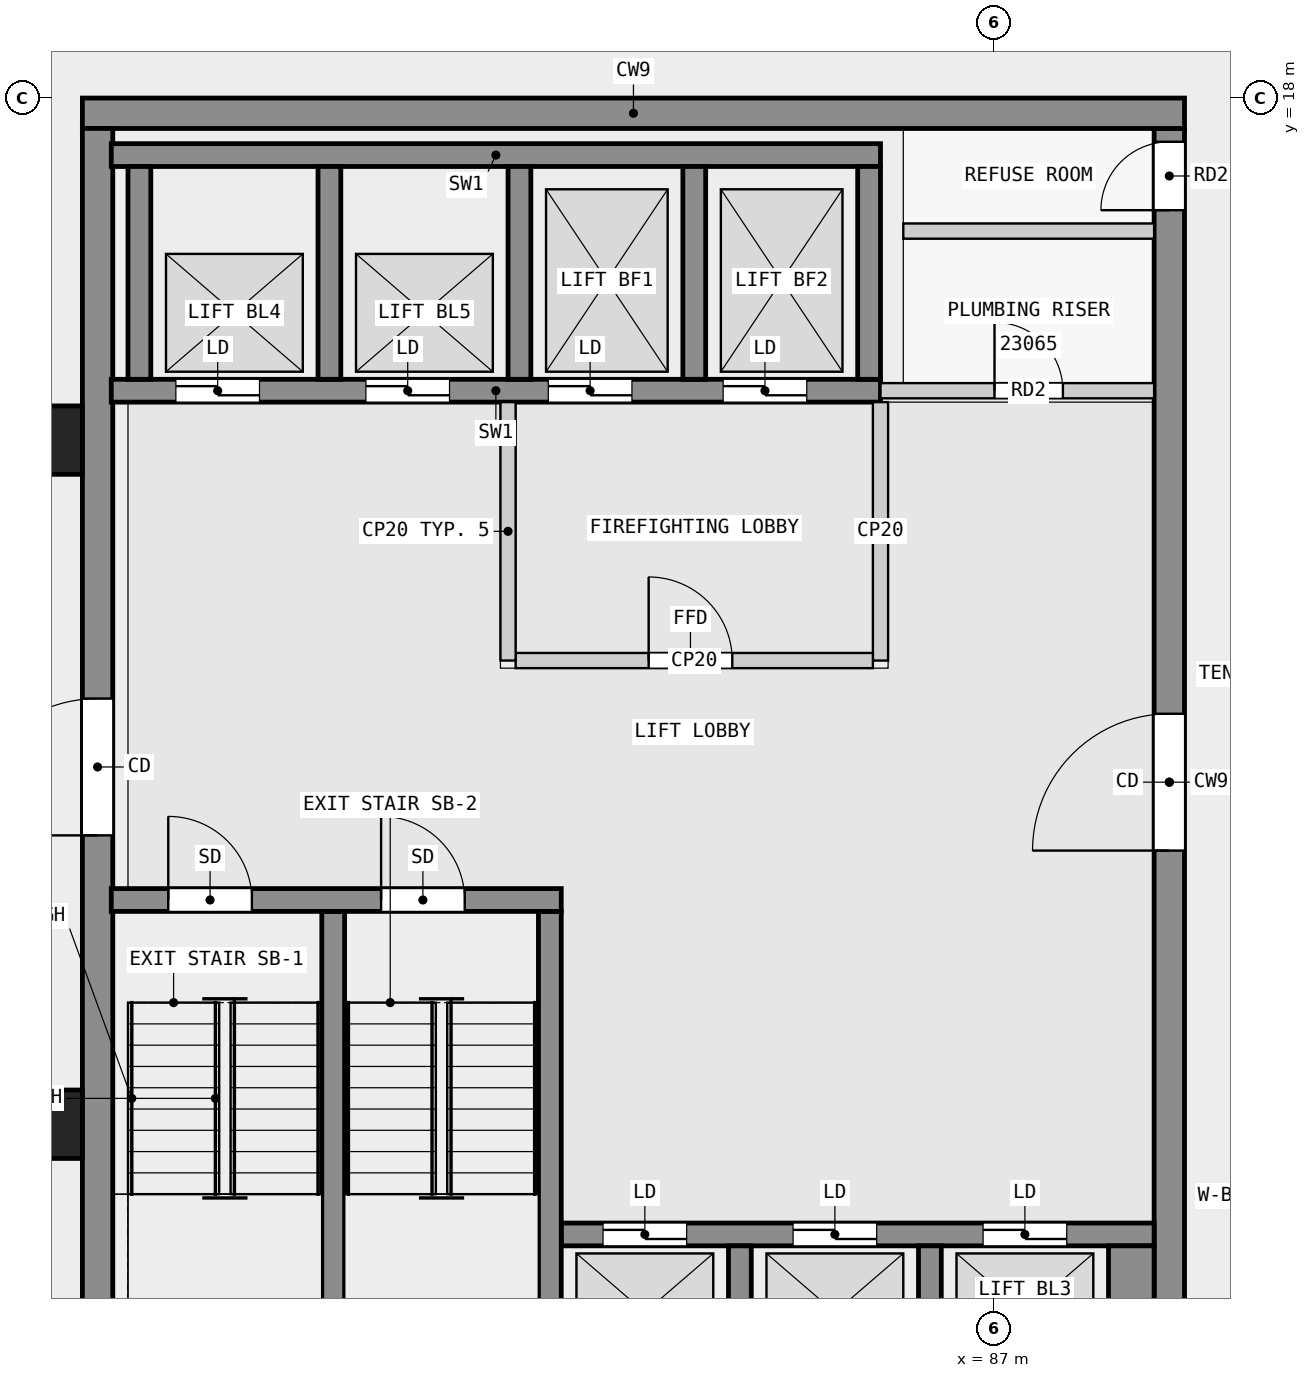
"""IFC4 building model, lengths in metres.
Left out: names, types, materials, properties, quantities, classifications, styles, units other than length and angle.
Written with IfcOpenShell. Run it as: python <this file> out.ifc"""

import sys

from ifc_helpers import new_model, si_unit, direction, frame, frame_2d, origin, origin_2d, place, context, subcontext, project, spatial, rectangle, extrude, element, fill, save


model = new_model("IFC4")
c1 = context("Model", 3, precision=1e-05, world=origin(), true_north=direction((0.0, 1.0)))
c2 = subcontext(c1, "Body", "Model", "MODEL_VIEW")
j1 = project(units=[si_unit("LENGTHUNIT", "METRE"), si_unit("PLANEANGLEUNIT", "RADIAN")], contexts=[c1])
p1 = place(None, origin())
s1 = spatial("IfcSite", under=j1, at=p1, CompositionType="ELEMENT")
p2 = place(p1, origin())
s2 = spatial("IfcBuilding", under=s1, at=p2, CompositionType="ELEMENT")
p3 = place(p2, frame((0.0, 0.0, 92.3)))
s3 = spatial("IfcBuildingStorey", under=s2, at=p3, CompositionType="ELEMENT", Elevation=92.3)
for number, where, z_axis, x_axis in (
    (1, (74.55, 13.5, 0.0), (0.0, 0.0, 1.0), (1.0, 0.0, 0.0)),
    (2, (74.55, 4.5, 0.0), (0.0, 0.0, 1.0), (1.0, 0.0, 0.0)),
):
    element("IfcColumn", number, at=place(p3, frame(where, z_axis=z_axis, x_axis=x_axis)), inside=s3, PredefinedType="COLUMN", context=c2, shape_type="SweptSolid", body=[
        extrude(rectangle(XDim=0.9, YDim=0.9, at=origin_2d()), origin(), (0.0, 0.0, 1.0), 3.5),
    ])
p4 = place(p3, frame((75.0, 17.8, 0.0), z_axis=(0.0, 0.0, 1.0), x_axis=(1.0, 0.0, 0.0)))
e3 = element("IfcWall", 3, at=p4, inside=s3, PredefinedType="SHEAR", context=c2, shape_type="SweptSolid", body=[
    extrude(rectangle(XDim=14.5, YDim=0.4, at=frame_2d((7.25, 0.0))), origin(), (0.0, 0.0, 1.0), 3.25),
])
p5 = place(p3, frame((75.2, 0.4, 0.0), z_axis=(0.0, 0.0, 1.0), x_axis=(0.0, 1.0, 0.0)))
e4 = element("IfcWall", 4, at=p5, inside=s3, PredefinedType="SHEAR", context=c2, shape_type="SweptSolid", body=[
    extrude(rectangle(XDim=17.2, YDim=0.4, at=frame_2d((8.6, 0.0))), origin(), (0.0, 0.0, 1.0), 3.25),
])
p6 = place(p5, frame((7.9, 0.0, 0.0)))
e5 = element("IfcOpeningElement", 5, at=p6, cuts=e4, PredefinedType="OPENING", context=c2, shape_type="SweptSolid", body=[
    extrude(rectangle(XDim=1.8, YDim=2.1, at=frame_2d((0.9, 1.05))), frame((0.0, 0.21, 0.0), z_axis=(0.0, -1.0, 0.0), x_axis=(1.0, 0.0, 0.0)), (0.0, 0.0, 1.0), 0.42),
])
p7 = place(p3, frame((89.3, 0.4, 0.0), z_axis=(0.0, 0.0, 1.0), x_axis=(0.0, 1.0, 0.0)))
e6 = element("IfcWall", 6, at=p7, inside=s3, PredefinedType="SHEAR", context=c2, shape_type="SweptSolid", body=[
    extrude(rectangle(XDim=17.2, YDim=0.4, at=frame_2d((8.6, 0.0))), origin(), (0.0, 0.0, 1.0), 3.25),
])
p8 = place(p7, frame((7.7, 0.0, 0.0)))
e7 = element("IfcOpeningElement", 7, at=p8, cuts=e6, PredefinedType="OPENING", context=c2, shape_type="SweptSolid", body=[
    extrude(rectangle(XDim=1.8, YDim=2.1, at=frame_2d((0.9, 1.05))), frame((0.0, 0.21, 0.0), z_axis=(0.0, -1.0, 0.0), x_axis=(1.0, 0.0, 0.0)), (0.0, 0.0, 1.0), 0.42),
])
p9 = place(p7, frame((16.125, 0.0, 0.0)))
e8 = element("IfcOpeningElement", 8, at=p9, cuts=e6, PredefinedType="OPENING", context=c2, shape_type="SweptSolid", body=[
    extrude(rectangle(XDim=0.9, YDim=2.1, at=frame_2d((0.45, 1.05))), frame((0.0, 0.21, 0.0), z_axis=(0.0, -1.0, 0.0), x_axis=(1.0, 0.0, 0.0)), (0.0, 0.0, 1.0), 0.42),
])
p10 = place(p3, frame((75.38, 7.45, 0.0), z_axis=(0.0, 0.0, 1.0), x_axis=(1.0, 0.0, 0.0)))
e9 = element("IfcWall", 9, at=p10, inside=s3, PredefinedType="SHEAR", context=c2, shape_type="SweptSolid", body=[
    extrude(rectangle(XDim=5.92, YDim=0.3, at=frame_2d((2.96, 0.0))), origin(), (0.0, 0.0, 1.0), 3.25),
])
p11 = place(p10, frame((0.75, 0.0, 0.0)))
e10 = element("IfcOpeningElement", 10, at=p11, cuts=e9, PredefinedType="OPENING", context=c2, shape_type="SweptSolid", body=[
    extrude(rectangle(XDim=1.1, YDim=2.1, at=frame_2d((0.55, 1.05))), frame((0.0, 0.16, 0.0), z_axis=(0.0, -1.0, 0.0), x_axis=(1.0, 0.0, 0.0)), (0.0, 0.0, 1.0), 0.32),
])
p12 = place(p10, frame((3.55, 0.0, 0.0)))
e11 = element("IfcOpeningElement", 11, at=p12, cuts=e9, PredefinedType="OPENING", context=c2, shape_type="SweptSolid", body=[
    extrude(rectangle(XDim=1.1, YDim=2.1, at=frame_2d((0.55, 1.05))), frame((0.0, 0.16, 0.0), z_axis=(0.0, -1.0, 0.0), x_axis=(1.0, 0.0, 0.0)), (0.0, 0.0, 1.0), 0.32),
])
for number, where, z_axis, x_axis in (
    (12, (78.3, 0.9, 0.0), (0.0, 0.0, 1.0), (0.0, 1.0, 0.0)),
    (13, (81.15, 0.9, 0.0), (0.0, 0.0, 1.0), (0.0, 1.0, 0.0)),
):
    element("IfcWall", number, at=place(p3, frame(where, z_axis=z_axis, x_axis=x_axis)), inside=s3, PredefinedType="SHEAR", context=c2, shape_type="SweptSolid", body=[
        extrude(rectangle(XDim=6.4, YDim=0.3, at=frame_2d((3.2, 0.0))), origin(), (0.0, 0.0, 1.0), 3.25),
    ])
for number, where, z_axis, x_axis in (
    (14, (83.65, 0.9, 0.0), (0.0, 0.0, 1.0), (0.0, 1.0, 0.0)),
    (15, (86.15, 0.9, 0.0), (0.0, 0.0, 1.0), (0.0, 1.0, 0.0)),
):
    element("IfcWall", number, at=place(p3, frame(where, z_axis=z_axis, x_axis=x_axis)), inside=s3, PredefinedType="SHEAR", context=c2, shape_type="SweptSolid", body=[
        extrude(rectangle(XDim=2.0, YDim=0.3, at=frame_2d((1.0, 0.0))), origin(), (0.0, 0.0, 1.0), 3.25),
    ])
p13 = place(p3, frame((88.8, 0.9, 0.0), z_axis=(0.0, 0.0, 1.0), x_axis=(0.0, 1.0, 0.0)))
e16 = element("IfcWall", 16, at=p13, inside=s3, PredefinedType="SHEAR", context=c2, shape_type="SweptSolid", body=[
    extrude(rectangle(XDim=2.0, YDim=0.6, at=frame_2d((1.0, 0.0))), origin(), (0.0, 0.0, 1.0), 3.25),
])
p14 = place(p3, frame((81.3, 3.05, 0.0), z_axis=(0.0, 0.0, 1.0), x_axis=(1.0, 0.0, 0.0)))
e17 = element("IfcWall", 17, at=p14, inside=s3, PredefinedType="SHEAR", context=c2, shape_type="SweptSolid", body=[
    extrude(rectangle(XDim=7.8, YDim=0.3, at=frame_2d((3.9, 0.0))), origin(), (0.0, 0.0, 1.0), 3.25),
])
p15 = place(p14, frame((0.55, 0.0, 0.0)))
e18 = element("IfcOpeningElement", 18, at=p15, cuts=e17, PredefinedType="OPENING", context=c2, shape_type="SweptSolid", body=[
    extrude(rectangle(XDim=1.1, YDim=2.1, at=frame_2d((0.55, 1.05))), frame((0.0, 0.16, 0.0), z_axis=(0.0, -1.0, 0.0), x_axis=(1.0, 0.0, 0.0)), (0.0, 0.0, 1.0), 0.32),
])
p16 = place(p14, frame((3.05, 0.0, 0.0)))
e19 = element("IfcOpeningElement", 19, at=p16, cuts=e17, PredefinedType="OPENING", context=c2, shape_type="SweptSolid", body=[
    extrude(rectangle(XDim=1.1, YDim=2.1, at=frame_2d((0.55, 1.05))), frame((0.0, 0.16, 0.0), z_axis=(0.0, -1.0, 0.0), x_axis=(1.0, 0.0, 0.0)), (0.0, 0.0, 1.0), 0.32),
])
p17 = place(p14, frame((5.55, 0.0, 0.0)))
e20 = element("IfcOpeningElement", 20, at=p17, cuts=e17, PredefinedType="OPENING", context=c2, shape_type="SweptSolid", body=[
    extrude(rectangle(XDim=1.1, YDim=2.1, at=frame_2d((0.55, 1.05))), frame((0.0, 0.16, 0.0), z_axis=(0.0, -1.0, 0.0), x_axis=(1.0, 0.0, 0.0)), (0.0, 0.0, 1.0), 0.32),
])
p18 = place(p3, frame((75.38, 17.25, 0.0), z_axis=(0.0, 0.0, 1.0), x_axis=(1.0, 0.0, 0.0)))
e21 = element("IfcWall", 21, at=p18, inside=s3, PredefinedType="SHEAR", context=c2, shape_type="SweptSolid", body=[
    extrude(rectangle(XDim=10.12, YDim=0.3, at=frame_2d((5.06, 0.0))), origin(), (0.0, 0.0, 1.0), 3.25),
])
p19 = place(p3, frame((75.38, 14.15, 0.0), z_axis=(0.0, 0.0, 1.0), x_axis=(1.0, 0.0, 0.0)))
e22 = element("IfcWall", 22, at=p19, inside=s3, PredefinedType="SHEAR", context=c2, shape_type="SweptSolid", body=[
    extrude(rectangle(XDim=10.12, YDim=0.3, at=frame_2d((5.06, 0.0))), origin(), (0.0, 0.0, 1.0), 3.25),
])
p20 = place(p19, frame((0.85, 0.0, 0.0)))
e23 = element("IfcOpeningElement", 23, at=p20, cuts=e22, PredefinedType="OPENING", context=c2, shape_type="SweptSolid", body=[
    extrude(rectangle(XDim=1.1, YDim=2.1, at=frame_2d((0.55, 1.05))), frame((0.0, 0.16, 0.0), z_axis=(0.0, -1.0, 0.0), x_axis=(1.0, 0.0, 0.0)), (0.0, 0.0, 1.0), 0.32),
])
p21 = place(p19, frame((3.35, 0.0, 0.0)))
e24 = element("IfcOpeningElement", 24, at=p21, cuts=e22, PredefinedType="OPENING", context=c2, shape_type="SweptSolid", body=[
    extrude(rectangle(XDim=1.1, YDim=2.1, at=frame_2d((0.55, 1.05))), frame((0.0, 0.16, 0.0), z_axis=(0.0, -1.0, 0.0), x_axis=(1.0, 0.0, 0.0)), (0.0, 0.0, 1.0), 0.32),
])
p22 = place(p19, frame((5.75, 0.0, 0.0)))
e25 = element("IfcOpeningElement", 25, at=p22, cuts=e22, PredefinedType="OPENING", context=c2, shape_type="SweptSolid", body=[
    extrude(rectangle(XDim=1.1, YDim=2.1, at=frame_2d((0.55, 1.05))), frame((0.0, 0.16, 0.0), z_axis=(0.0, -1.0, 0.0), x_axis=(1.0, 0.0, 0.0)), (0.0, 0.0, 1.0), 0.32),
])
p23 = place(p19, frame((8.05, 0.0, 0.0)))
e26 = element("IfcOpeningElement", 26, at=p23, cuts=e22, PredefinedType="OPENING", context=c2, shape_type="SweptSolid", body=[
    extrude(rectangle(XDim=1.1, YDim=2.1, at=frame_2d((0.55, 1.05))), frame((0.0, 0.16, 0.0), z_axis=(0.0, -1.0, 0.0), x_axis=(1.0, 0.0, 0.0)), (0.0, 0.0, 1.0), 0.32),
])
for number, where, z_axis, x_axis in (
    (27, (75.75, 14.3, 0.0), (0.0, 0.0, 1.0), (0.0, 1.0, 0.0)),
    (28, (78.25, 14.3, 0.0), (0.0, 0.0, 1.0), (0.0, 1.0, 0.0)),
    (29, (80.75, 14.3, 0.0), (0.0, 0.0, 1.0), (0.0, 1.0, 0.0)),
    (30, (83.05, 14.3, 0.0), (0.0, 0.0, 1.0), (0.0, 1.0, 0.0)),
    (31, (85.35, 14.3, 0.0), (0.0, 0.0, 1.0), (0.0, 1.0, 0.0)),
):
    element("IfcWall", number, at=place(p3, frame(where, z_axis=z_axis, x_axis=x_axis)), inside=s3, PredefinedType="SHEAR", context=c2, shape_type="SweptSolid", body=[
        extrude(rectangle(XDim=2.8, YDim=0.3, at=frame_2d((1.4, 0.0))), origin(), (0.0, 0.0, 1.0), 3.25),
    ])
p24 = place(p3, frame((80.6, 10.6, 0.0), z_axis=(0.0, 0.0, 1.0), x_axis=(0.0, 1.0, 0.0)))
e32 = element("IfcWall", 32, at=p24, inside=s3, PredefinedType="PARTITIONING", context=c2, shape_type="SweptSolid", body=[
    extrude(rectangle(XDim=3.4, YDim=0.2, at=frame_2d((1.7, 0.0))), origin(), (0.0, 0.0, 1.0), 3.25),
])
p25 = place(p3, frame((80.7, 10.6, 0.0), z_axis=(0.0, 0.0, 1.0), x_axis=(1.0, 0.0, 0.0)))
e33 = element("IfcWall", 33, at=p25, inside=s3, PredefinedType="PARTITIONING", context=c2, shape_type="SweptSolid", body=[
    extrude(rectangle(XDim=4.7, YDim=0.2, at=frame_2d((2.35, 0.0))), origin(), (0.0, 0.0, 1.0), 3.25),
])
p26 = place(p25, frame((1.75, 0.0, 0.0)))
e34 = element("IfcOpeningElement", 34, at=p26, cuts=e33, PredefinedType="OPENING", context=c2, shape_type="SweptSolid", body=[
    extrude(rectangle(XDim=1.1, YDim=2.1, at=frame_2d((0.55, 1.05))), frame((0.0, 0.11, 0.0), z_axis=(0.0, -1.0, 0.0), x_axis=(1.0, 0.0, 0.0)), (0.0, 0.0, 1.0), 0.22),
])
p27 = place(p3, frame((85.5, 10.6, 0.0), z_axis=(0.0, 0.0, 1.0), x_axis=(0.0, 1.0, 0.0)))
e35 = element("IfcWall", 35, at=p27, inside=s3, PredefinedType="PARTITIONING", context=c2, shape_type="SweptSolid", body=[
    extrude(rectangle(XDim=3.4, YDim=0.2, at=frame_2d((1.7, 0.0))), origin(), (0.0, 0.0, 1.0), 3.25),
])
p28 = place(p3, frame((85.5, 14.15, 0.0), z_axis=(0.0, 0.0, 1.0), x_axis=(1.0, 0.0, 0.0)))
e36 = element("IfcWall", 36, at=p28, inside=s3, PredefinedType="PARTITIONING", context=c2, shape_type="SweptSolid", body=[
    extrude(rectangle(XDim=3.6, YDim=0.2, at=frame_2d((1.8, 0.0))), origin(), (0.0, 0.0, 1.0), 3.25),
])
p29 = place(p28, frame((1.5, 0.0, 0.0)))
e37 = element("IfcOpeningElement", 37, at=p29, cuts=e36, PredefinedType="OPENING", context=c2, shape_type="SweptSolid", body=[
    extrude(rectangle(XDim=0.9, YDim=2.1, at=frame_2d((0.45, 1.05))), frame((0.0, 0.11, 0.0), z_axis=(0.0, -1.0, 0.0), x_axis=(1.0, 0.0, 0.0)), (0.0, 0.0, 1.0), 0.22),
])
p30 = place(p3, frame((85.8, 16.25, 0.0), z_axis=(0.0, 0.0, 1.0), x_axis=(1.0, 0.0, 0.0)))
e38 = element("IfcWall", 38, at=p30, inside=s3, PredefinedType="PARTITIONING", context=c2, shape_type="SweptSolid", body=[
    extrude(rectangle(XDim=3.3, YDim=0.2, at=frame_2d((1.65, 0.0))), origin(), (0.0, 0.0, 1.0), 3.25),
])
p31 = place(p26, origin())
e39 = element("IfcDoor", 39, at=p31, inside=s3, OperationType="SINGLE_SWING_LEFT", PredefinedType="DOOR", context=c2, shape_type="SweptSolid", body=[
    extrude(rectangle(XDim=1.1, YDim=2.1, at=frame_2d((0.55, 1.05))), frame((0.0, 0.025, 0.0), z_axis=(0.0, -1.0, 0.0), x_axis=(1.0, 0.0, 0.0)), (0.0, 0.0, 1.0), 0.05),
])
fill(e34, e39)
p32 = place(p15, origin())
e40 = element("IfcDoor", 40, at=p32, inside=s3, OperationType="DOUBLE_DOOR_SLIDING", PredefinedType="DOOR", context=c2, shape_type="SweptSolid", body=[
    extrude(rectangle(XDim=1.1, YDim=2.1, at=frame_2d((0.55, 1.05))), frame((0.0, 0.025, 0.0), z_axis=(0.0, -1.0, 0.0), x_axis=(1.0, 0.0, 0.0)), (0.0, 0.0, 1.0), 0.05),
])
fill(e18, e40)
p33 = place(p16, origin())
e41 = element("IfcDoor", 41, at=p33, inside=s3, OperationType="DOUBLE_DOOR_SLIDING", PredefinedType="DOOR", context=c2, shape_type="SweptSolid", body=[
    extrude(rectangle(XDim=1.1, YDim=2.1, at=frame_2d((0.55, 1.05))), frame((0.0, 0.025, 0.0), z_axis=(0.0, -1.0, 0.0), x_axis=(1.0, 0.0, 0.0)), (0.0, 0.0, 1.0), 0.05),
])
fill(e19, e41)
p34 = place(p17, origin())
e42 = element("IfcDoor", 42, at=p34, inside=s3, OperationType="DOUBLE_DOOR_SLIDING", PredefinedType="DOOR", context=c2, shape_type="SweptSolid", body=[
    extrude(rectangle(XDim=1.1, YDim=2.1, at=frame_2d((0.55, 1.05))), frame((0.0, 0.025, 0.0), z_axis=(0.0, -1.0, 0.0), x_axis=(1.0, 0.0, 0.0)), (0.0, 0.0, 1.0), 0.05),
])
fill(e20, e42)
p35 = place(p20, origin())
e43 = element("IfcDoor", 43, at=p35, inside=s3, OperationType="DOUBLE_DOOR_SLIDING", PredefinedType="DOOR", context=c2, shape_type="SweptSolid", body=[
    extrude(rectangle(XDim=1.1, YDim=2.1, at=frame_2d((0.55, 1.05))), frame((0.0, 0.025, 0.0), z_axis=(0.0, -1.0, 0.0), x_axis=(1.0, 0.0, 0.0)), (0.0, 0.0, 1.0), 0.05),
])
fill(e23, e43)
p36 = place(p21, origin())
e44 = element("IfcDoor", 44, at=p36, inside=s3, OperationType="DOUBLE_DOOR_SLIDING", PredefinedType="DOOR", context=c2, shape_type="SweptSolid", body=[
    extrude(rectangle(XDim=1.1, YDim=2.1, at=frame_2d((0.55, 1.05))), frame((0.0, 0.025, 0.0), z_axis=(0.0, -1.0, 0.0), x_axis=(1.0, 0.0, 0.0)), (0.0, 0.0, 1.0), 0.05),
])
fill(e24, e44)
p37 = place(p22, origin())
e45 = element("IfcDoor", 45, at=p37, inside=s3, OperationType="DOUBLE_DOOR_SLIDING", PredefinedType="DOOR", context=c2, shape_type="SweptSolid", body=[
    extrude(rectangle(XDim=1.1, YDim=2.1, at=frame_2d((0.55, 1.05))), frame((0.0, 0.025, 0.0), z_axis=(0.0, -1.0, 0.0), x_axis=(1.0, 0.0, 0.0)), (0.0, 0.0, 1.0), 0.05),
])
fill(e25, e45)
p38 = place(p23, origin())
e46 = element("IfcDoor", 46, at=p38, inside=s3, OperationType="DOUBLE_DOOR_SLIDING", PredefinedType="DOOR", context=c2, shape_type="SweptSolid", body=[
    extrude(rectangle(XDim=1.1, YDim=2.1, at=frame_2d((0.55, 1.05))), frame((0.0, 0.025, 0.0), z_axis=(0.0, -1.0, 0.0), x_axis=(1.0, 0.0, 0.0)), (0.0, 0.0, 1.0), 0.05),
])
fill(e26, e46)
p39 = place(p11, origin())
e47 = element("IfcDoor", 47, at=p39, inside=s3, OperationType="SINGLE_SWING_RIGHT", PredefinedType="DOOR", context=c2, shape_type="SweptSolid", body=[
    extrude(rectangle(XDim=1.1, YDim=2.1, at=frame_2d((0.55, 1.05))), frame((0.0, 0.025, 0.0), z_axis=(0.0, -1.0, 0.0), x_axis=(1.0, 0.0, 0.0)), (0.0, 0.0, 1.0), 0.05),
])
fill(e10, e47)
p40 = place(p12, origin())
e48 = element("IfcDoor", 48, at=p40, inside=s3, OperationType="SINGLE_SWING_LEFT", PredefinedType="DOOR", context=c2, shape_type="SweptSolid", body=[
    extrude(rectangle(XDim=1.1, YDim=2.1, at=frame_2d((0.55, 1.05))), frame((0.0, 0.025, 0.0), z_axis=(0.0, -1.0, 0.0), x_axis=(1.0, 0.0, 0.0)), (0.0, 0.0, 1.0), 0.05),
])
fill(e11, e48)
p41 = place(p6, origin())
e49 = element("IfcDoor", 49, at=p41, inside=s3, OperationType="DOUBLE_DOOR_SINGLE_SWING", PredefinedType="DOOR", context=c2, shape_type="SweptSolid", body=[
    extrude(rectangle(XDim=1.8, YDim=2.1, at=frame_2d((0.9, 1.05))), frame((0.0, 0.025, 0.0), z_axis=(0.0, -1.0, 0.0), x_axis=(1.0, 0.0, 0.0)), (0.0, 0.0, 1.0), 0.05),
])
fill(e5, e49)
p42 = place(p8, origin())
e50 = element("IfcDoor", 50, at=p42, inside=s3, OperationType="DOUBLE_DOOR_SINGLE_SWING", PredefinedType="DOOR", context=c2, shape_type="SweptSolid", body=[
    extrude(rectangle(XDim=1.8, YDim=2.1, at=frame_2d((0.9, 1.05))), frame((0.0, 0.025, 0.0), z_axis=(0.0, -1.0, 0.0), x_axis=(1.0, 0.0, 0.0)), (0.0, 0.0, 1.0), 0.05),
])
fill(e7, e50)
p43 = place(p29, origin())
e51 = element("IfcDoor", 51, at=p43, inside=s3, OperationType="SINGLE_SWING_LEFT", PredefinedType="DOOR", context=c2, shape_type="SweptSolid", body=[
    extrude(rectangle(XDim=0.9, YDim=2.1, at=frame_2d((0.45, 1.05))), frame((0.0, 0.025, 0.0), z_axis=(0.0, -1.0, 0.0), x_axis=(1.0, 0.0, 0.0)), (0.0, 0.0, 1.0), 0.05),
])
fill(e37, e51)
p44 = place(p9, origin())
e52 = element("IfcDoor", 52, at=p44, inside=s3, OperationType="SINGLE_SWING_LEFT", PredefinedType="DOOR", context=c2, shape_type="SweptSolid", body=[
    extrude(rectangle(XDim=0.9, YDim=2.1, at=frame_2d((0.45, 1.05))), frame((0.0, 0.025, 0.0), z_axis=(0.0, -1.0, 0.0), x_axis=(1.0, 0.0, 0.0)), (0.0, 0.0, 1.0), 0.05),
])
fill(e8, e52)
save(model, sys.argv[1])
